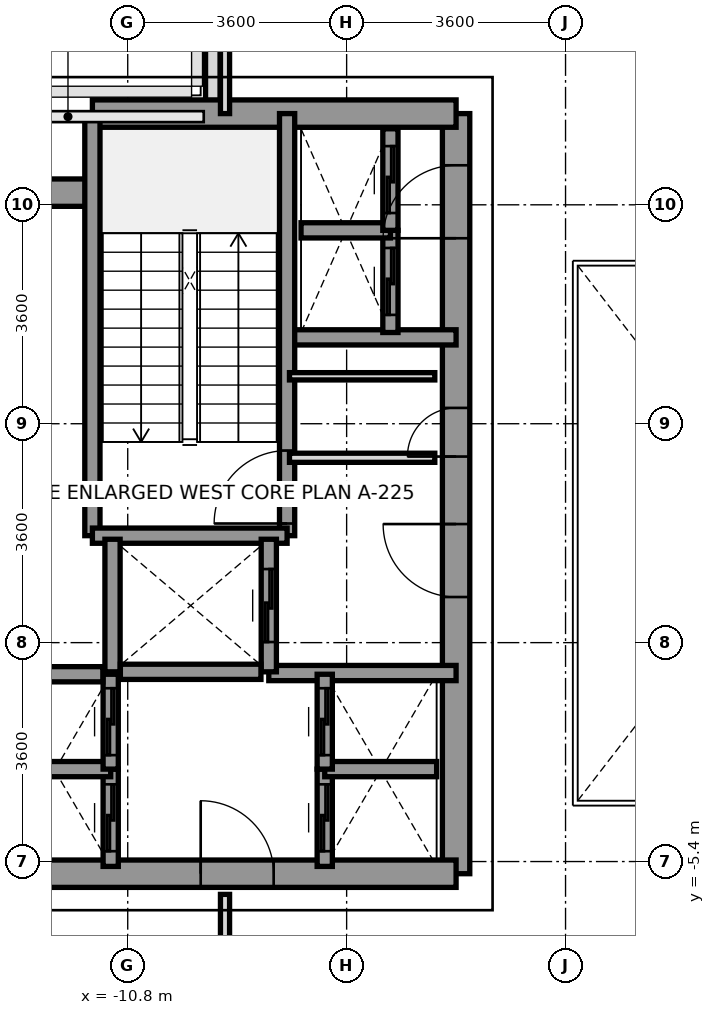
"""IFC4 building model, lengths in metres.
Left out: names, types, materials, properties, quantities, classifications, styles, units other than length and angle.
Written with IfcOpenShell. Run it as: python <this file> out.ifc"""

import sys

from ifc_helpers import new_model, si_unit, direction, frame, frame_2d, origin, place, context, subcontext, project, spatial, rectangle, extrude, source, transform, mapped, element, fill, save


model = new_model("IFC4")
c1 = context("Model", 3, precision=1e-05, world=origin(), true_north=direction((0.0, 1.0)))
c2 = subcontext(c1, "Body", "Model", "MODEL_VIEW")
j1 = project(units=[si_unit("LENGTHUNIT", "METRE"), si_unit("PLANEANGLEUNIT", "RADIAN")], contexts=[c1])
p1 = place(None, origin())
s1 = spatial("IfcSite", under=j1, at=p1, CompositionType="ELEMENT")
p2 = place(p1, origin())
s2 = spatial("IfcBuilding", under=s1, at=p2, CompositionType="ELEMENT")
p3 = place(p2, frame((0.0, 0.0, 93.0)))
s3 = spatial("IfcBuildingStorey", under=s2, at=p3, CompositionType="ELEMENT", Elevation=93.0)
p4 = place(p3, frame((-9.4, 6.953, 0.0), z_axis=(0.0, 0.0, 1.0), x_axis=(0.0, 1.0, 0.0)))
e1 = element("IfcWall", 1, at=p4, inside=s3, PredefinedType="PARAPET", context=c2, shape_type="SweptSolid", body=[
    extrude(rectangle(XDim=1.519, YDim=0.24, at=frame_2d((0.76, 0.0))), origin(), (0.0, 0.0, 1.0), 1.15),
])
p5 = place(p3, frame((-5.4, -5.6, 0.0), z_axis=(0.0, 0.0, 1.0), x_axis=(0.0, 1.0, 0.0)))
e2 = element("IfcWall", 2, at=p5, inside=s3, PredefinedType="SHEAR", context=c2, shape_type="SweptSolid", body=[
    extrude(rectangle(XDim=12.5, YDim=0.45, at=frame_2d((6.25, 0.0))), origin(), (0.0, 0.0, 1.0), 4.0),
])
p6 = place(p5, frame((4.55, 0.0, 0.0)))
e3 = element("IfcOpeningElement", 3, at=p6, cuts=e2, PredefinedType="OPENING", context=c2, shape_type="SweptSolid", body=[
    extrude(rectangle(XDim=1.2, YDim=2.2, at=frame_2d((0.6, 1.1))), frame((0.0, 0.235, 0.0), z_axis=(0.0, -1.0, 0.0), x_axis=(1.0, 0.0, 0.0)), (0.0, 0.0, 1.0), 0.47),
])
p7 = place(p5, frame((10.45, 0.0, 0.0)))
e4 = element("IfcOpeningElement", 4, at=p7, cuts=e2, PredefinedType="OPENING", context=c2, shape_type="SweptSolid", body=[
    extrude(rectangle(XDim=1.2, YDim=2.2, at=frame_2d((0.6, 1.1))), frame((0.0, 0.235, 0.0), z_axis=(0.0, -1.0, 0.0), x_axis=(1.0, 0.0, 0.0)), (0.0, 0.0, 1.0), 0.47),
])
p8 = place(p5, frame((6.86, 0.0, 0.0)))
e5 = element("IfcOpeningElement", 5, at=p8, cuts=e2, PredefinedType="OPENING", context=c2, shape_type="SweptSolid", body=[
    extrude(rectangle(XDim=0.8, YDim=2.1, at=frame_2d((0.4, 1.05))), frame((0.0, 0.235, 0.0), z_axis=(0.0, -1.0, 0.0), x_axis=(1.0, 0.0, 0.0)), (0.0, 0.0, 1.0), 0.47),
])
p9 = place(p3, frame((-11.381, 6.9, 0.0), z_axis=(0.0, 0.0, 1.0), x_axis=(1.0, 0.0, 0.0)))
e6 = element("IfcWall", 6, at=p9, inside=s3, PredefinedType="SHEAR", context=c2, shape_type="SweptSolid", body=[
    extrude(rectangle(XDim=5.981, YDim=0.45, at=frame_2d((2.991, 0.0))), origin(), (0.0, 0.0, 1.0), 4.0),
])
p10 = place(p3, frame((-13.2, 5.6, 0.0), z_axis=(0.0, 0.0, 1.0), x_axis=(1.0, 0.0, 0.0)))
e7 = element("IfcWall", 7, at=p10, inside=s3, PredefinedType="SHEAR", context=c2, shape_type="SweptSolid", body=[
    extrude(rectangle(XDim=1.819, YDim=0.45, at=frame_2d((0.909, 0.0))), origin(), (0.0, 0.0, 1.0), 4.0),
])
p11 = place(p3, frame((-13.2, -5.6, 0.0), z_axis=(0.0, 0.0, 1.0), x_axis=(1.0, 0.0, 0.0)))
e8 = element("IfcWall", 8, at=p11, inside=s3, PredefinedType="SHEAR", context=c2, shape_type="SweptSolid", body=[
    extrude(rectangle(XDim=7.8, YDim=0.45, at=frame_2d((3.9, 0.0))), origin(), (0.0, 0.0, 1.0), 4.0),
])
p12 = place(p11, frame((3.6, 0.0, 0.0)))
e9 = element("IfcOpeningElement", 9, at=p12, cuts=e8, PredefinedType="OPENING", context=c2, shape_type="SweptSolid", body=[
    extrude(rectangle(XDim=1.2, YDim=2.2, at=frame_2d((0.6, 1.1))), frame((0.0, 0.235, 0.0), z_axis=(0.0, -1.0, 0.0), x_axis=(1.0, 0.0, 0.0)), (0.0, 0.0, 1.0), 0.47),
])
p13 = place(p3, frame((-8.18, 3.22, 0.0), z_axis=(0.0, 0.0, 1.0), x_axis=(1.0, 0.0, 0.0)))
e10 = element("IfcWall", 10, at=p13, inside=s3, PredefinedType="SOLIDWALL", context=c2, shape_type="SweptSolid", body=[
    extrude(rectangle(XDim=2.78, YDim=0.25, at=frame_2d((1.39, 0.0))), origin(), (0.0, 0.0, 1.0), 4.0),
])
p14 = place(p3, frame((-8.48, -2.3, 0.0), z_axis=(0.0, 0.0, 1.0), x_axis=(1.0, 0.0, 0.0)))
e11 = element("IfcWall", 11, at=p14, inside=s3, PredefinedType="SOLIDWALL", context=c2, shape_type="SweptSolid", body=[
    extrude(rectangle(XDim=3.08, YDim=0.25, at=frame_2d((1.54, 0.0))), origin(), (0.0, 0.0, 1.0), 4.0),
])
p15 = place(p3, frame((-8.179, -0.041, 0.0), z_axis=(0.0, 0.0, 1.0), x_axis=(0.0, 1.0, 0.0)))
e12 = element("IfcWall", 12, at=p15, inside=s3, PredefinedType="SOLIDWALL", context=c2, shape_type="SweptSolid", body=[
    extrude(rectangle(XDim=6.941, YDim=0.25, at=frame_2d((3.47, 0.0))), origin(), (0.0, 0.0, 1.0), 4.0),
])
p16 = place(p15, frame((0.2, 0.0, 0.0)))
e13 = element("IfcOpeningElement", 13, at=p16, cuts=e12, PredefinedType="OPENING", context=c2, shape_type="SweptSolid", body=[
    extrude(rectangle(XDim=1.2, YDim=2.2, at=frame_2d((0.6, 1.1))), frame((0.0, 0.135, 0.0), z_axis=(0.0, -1.0, 0.0), x_axis=(1.0, 0.0, 0.0)), (0.0, 0.0, 1.0), 0.27),
])
p17 = place(p3, frame((-11.381, -0.041, 0.0), z_axis=(0.0, 0.0, 1.0), x_axis=(0.0, 1.0, 0.0)))
e14 = element("IfcWall", 14, at=p17, inside=s3, PredefinedType="SOLIDWALL", context=c2, shape_type="SweptSolid", body=[
    extrude(rectangle(XDim=6.941, YDim=0.25, at=frame_2d((3.47, 0.0))), origin(), (0.0, 0.0, 1.0), 4.0),
])
p18 = place(p3, frame((-11.381, -0.041, 0.0), z_axis=(0.0, 0.0, 1.0), x_axis=(1.0, 0.0, 0.0)))
e15 = element("IfcWall", 15, at=p18, inside=s3, PredefinedType="SOLIDWALL", context=c2, shape_type="SweptSolid", body=[
    extrude(rectangle(XDim=3.202, YDim=0.25, at=frame_2d((1.601, 0.0))), origin(), (0.0, 0.0, 1.0), 4.0),
])
p19 = place(p3, frame((-11.05, -2.28, 0.0), z_axis=(0.0, 0.0, 1.0), x_axis=(0.0, 1.0, 0.0)))
e16 = element("IfcWall", 16, at=p19, inside=s3, PredefinedType="SOLIDWALL", context=c2, shape_type="SweptSolid", body=[
    extrude(rectangle(XDim=2.18, YDim=0.25, at=frame_2d((1.09, 0.0))), origin(), (0.0, 0.0, 1.0), 4.0),
])
p20 = place(p3, frame((-8.48, -2.28, 0.0), z_axis=(0.0, 0.0, 1.0), x_axis=(0.0, 1.0, 0.0)))
e17 = element("IfcWall", 17, at=p20, inside=s3, PredefinedType="SOLIDWALL", context=c2, shape_type="SweptSolid", body=[
    extrude(rectangle(XDim=2.18, YDim=0.25, at=frame_2d((1.09, 0.0))), origin(), (0.0, 0.0, 1.0), 4.0),
])
p21 = place(p20, frame((0.49, 0.0, 0.0)))
e18 = element("IfcOpeningElement", 18, at=p21, cuts=e17, PredefinedType="OPENING", context=c2, shape_type="SweptSolid", body=[
    extrude(rectangle(XDim=1.2, YDim=2.2, at=frame_2d((0.6, 1.1))), frame((0.0, 0.135, 0.0), z_axis=(0.0, -1.0, 0.0), x_axis=(1.0, 0.0, 0.0)), (0.0, 0.0, 1.0), 0.27),
])
p22 = place(p3, frame((-10.921, -2.28, 0.0), z_axis=(0.0, 0.0, 1.0), x_axis=(1.0, 0.0, 0.0)))
e19 = element("IfcWall", 19, at=p22, inside=s3, PredefinedType="SOLIDWALL", context=c2, shape_type="SweptSolid", body=[
    extrude(rectangle(XDim=2.312, YDim=0.25, at=frame_2d((1.156, 0.0))), origin(), (0.0, 0.0, 1.0), 4.0),
])
p23 = place(p3, frame((-11.08, -5.48, 0.0), z_axis=(0.0, 0.0, 1.0), x_axis=(0.0, 1.0, 0.0)))
e20 = element("IfcWall", 20, at=p23, inside=s3, PredefinedType="SOLIDWALL", context=c2, shape_type="SweptSolid", body=[
    extrude(rectangle(XDim=1.6, YDim=0.25, at=frame_2d((0.8, 0.0))), origin(), (0.0, 0.0, 1.0), 4.0),
])
p24 = place(p23, frame((0.25, 0.0, 0.0)))
e21 = element("IfcOpeningElement", 21, at=p24, cuts=e20, PredefinedType="OPENING", context=c2, shape_type="SweptSolid", body=[
    extrude(rectangle(XDim=1.1, YDim=2.2, at=frame_2d((0.55, 1.1))), frame((0.0, 0.135, 0.0), z_axis=(0.0, -1.0, 0.0), x_axis=(1.0, 0.0, 0.0)), (0.0, 0.0, 1.0), 0.27),
])
p25 = place(p3, frame((-12.92, -3.88, 0.0), z_axis=(0.0, 0.0, 1.0), x_axis=(1.0, 0.0, 0.0)))
e22 = element("IfcWall", 22, at=p25, inside=s3, PredefinedType="SOLIDWALL", context=c2, shape_type="SweptSolid", body=[
    extrude(rectangle(XDim=1.84, YDim=0.25, at=frame_2d((0.92, 0.0))), origin(), (0.0, 0.0, 1.0), 4.0),
])
p26 = place(p3, frame((-11.08, -3.88, 0.0), z_axis=(0.0, 0.0, 1.0), x_axis=(0.0, 1.0, 0.0)))
e23 = element("IfcWall", 23, at=p26, inside=s3, PredefinedType="SOLIDWALL", context=c2, shape_type="SweptSolid", body=[
    extrude(rectangle(XDim=1.56, YDim=0.25, at=frame_2d((0.78, 0.0))), origin(), (0.0, 0.0, 1.0), 4.0),
])
p27 = place(p26, frame((0.23, 0.0, 0.0)))
e24 = element("IfcOpeningElement", 24, at=p27, cuts=e23, PredefinedType="OPENING", context=c2, shape_type="SweptSolid", body=[
    extrude(rectangle(XDim=1.1, YDim=2.2, at=frame_2d((0.55, 1.1))), frame((0.0, 0.135, 0.0), z_axis=(0.0, -1.0, 0.0), x_axis=(1.0, 0.0, 0.0)), (0.0, 0.0, 1.0), 0.27),
])
p28 = place(p3, frame((-12.791, -2.32, 0.0), z_axis=(0.0, 0.0, 1.0), x_axis=(1.0, 0.0, 0.0)))
e25 = element("IfcWall", 25, at=p28, inside=s3, PredefinedType="SOLIDWALL", context=c2, shape_type="SweptSolid", body=[
    extrude(rectangle(XDim=1.582, YDim=0.25, at=frame_2d((0.791, 0.0))), origin(), (0.0, 0.0, 1.0), 4.0),
])
p29 = place(p3, frame((-7.56, -5.48, 0.0), z_axis=(0.0, 0.0, 1.0), x_axis=(0.0, 1.0, 0.0)))
e26 = element("IfcWall", 26, at=p29, inside=s3, PredefinedType="SOLIDWALL", context=c2, shape_type="SweptSolid", body=[
    extrude(rectangle(XDim=1.6, YDim=0.25, at=frame_2d((0.8, 0.0))), origin(), (0.0, 0.0, 1.0), 4.0),
])
p30 = place(p29, frame((0.25, 0.0, 0.0)))
e27 = element("IfcOpeningElement", 27, at=p30, cuts=e26, PredefinedType="OPENING", context=c2, shape_type="SweptSolid", body=[
    extrude(rectangle(XDim=1.1, YDim=2.2, at=frame_2d((0.55, 1.1))), frame((0.0, 0.135, 0.0), z_axis=(0.0, -1.0, 0.0), x_axis=(1.0, 0.0, 0.0)), (0.0, 0.0, 1.0), 0.27),
])
p31 = place(p3, frame((-7.56, -3.88, 0.0), z_axis=(0.0, 0.0, 1.0), x_axis=(1.0, 0.0, 0.0)))
e28 = element("IfcWall", 28, at=p31, inside=s3, PredefinedType="SOLIDWALL", context=c2, shape_type="SweptSolid", body=[
    extrude(rectangle(XDim=1.84, YDim=0.25, at=frame_2d((0.92, 0.0))), origin(), (0.0, 0.0, 1.0), 4.0),
])
p32 = place(p3, frame((-7.56, -3.88, 0.0), z_axis=(0.0, 0.0, 1.0), x_axis=(0.0, 1.0, 0.0)))
e29 = element("IfcWall", 29, at=p32, inside=s3, PredefinedType="SOLIDWALL", context=c2, shape_type="SweptSolid", body=[
    extrude(rectangle(XDim=1.56, YDim=0.25, at=frame_2d((0.78, 0.0))), origin(), (0.0, 0.0, 1.0), 4.0),
])
p33 = place(p32, frame((0.23, 0.0, 0.0)))
e30 = element("IfcOpeningElement", 30, at=p33, cuts=e29, PredefinedType="OPENING", context=c2, shape_type="SweptSolid", body=[
    extrude(rectangle(XDim=1.1, YDim=2.2, at=frame_2d((0.55, 1.1))), frame((0.0, 0.135, 0.0), z_axis=(0.0, -1.0, 0.0), x_axis=(1.0, 0.0, 0.0)), (0.0, 0.0, 1.0), 0.27),
])
p34 = place(p3, frame((-6.48, 3.3, 0.0), z_axis=(0.0, 0.0, 1.0), x_axis=(0.0, 1.0, 0.0)))
e31 = element("IfcWall", 31, at=p34, inside=s3, PredefinedType="SOLIDWALL", context=c2, shape_type="SweptSolid", body=[
    extrude(rectangle(XDim=1.68, YDim=0.25, at=frame_2d((0.84, 0.0))), origin(), (0.0, 0.0, 1.0), 4.0),
])
p35 = place(p34, frame((0.29, 0.0, 0.0)))
e32 = element("IfcOpeningElement", 32, at=p35, cuts=e31, PredefinedType="OPENING", context=c2, shape_type="SweptSolid", body=[
    extrude(rectangle(XDim=1.1, YDim=2.2, at=frame_2d((0.55, 1.1))), frame((0.0, 0.135, 0.0), z_axis=(0.0, -1.0, 0.0), x_axis=(1.0, 0.0, 0.0)), (0.0, 0.0, 1.0), 0.27),
])
p36 = place(p3, frame((-7.95, 4.98, 0.0), z_axis=(0.0, 0.0, 1.0), x_axis=(1.0, 0.0, 0.0)))
e33 = element("IfcWall", 33, at=p36, inside=s3, PredefinedType="SOLIDWALL", context=c2, shape_type="SweptSolid", body=[
    extrude(rectangle(XDim=1.47, YDim=0.25, at=frame_2d((0.735, 0.0))), origin(), (0.0, 0.0, 1.0), 4.0),
])
p37 = place(p3, frame((-6.48, 4.98, 0.0), z_axis=(0.0, 0.0, 1.0), x_axis=(0.0, 1.0, 0.0)))
e34 = element("IfcWall", 34, at=p37, inside=s3, PredefinedType="SOLIDWALL", context=c2, shape_type="SweptSolid", body=[
    extrude(rectangle(XDim=1.67, YDim=0.25, at=frame_2d((0.835, 0.0))), origin(), (0.0, 0.0, 1.0), 4.0),
])
p38 = place(p37, frame((0.285, 0.0, 0.0)))
e35 = element("IfcOpeningElement", 35, at=p38, cuts=e34, PredefinedType="OPENING", context=c2, shape_type="SweptSolid", body=[
    extrude(rectangle(XDim=1.1, YDim=2.2, at=frame_2d((0.55, 1.1))), frame((0.0, 0.135, 0.0), z_axis=(0.0, -1.0, 0.0), x_axis=(1.0, 0.0, 0.0)), (0.0, 0.0, 1.0), 0.27),
])
p39 = place(p3, frame((-8.14, 1.24, 0.0), z_axis=(0.0, 0.0, 1.0), x_axis=(1.0, 0.0, 0.0)))
e36 = element("IfcWall", 36, at=p39, inside=s3, PredefinedType="PARTITIONING", context=c2, shape_type="SweptSolid", body=[
    extrude(rectangle(XDim=2.39, YDim=0.15, at=frame_2d((1.195, 0.0))), origin(), (0.0, 0.0, 1.0), 3.1),
])
p40 = place(p3, frame((-8.14, 2.58, 0.0), z_axis=(0.0, 0.0, 1.0), x_axis=(1.0, 0.0, 0.0)))
e37 = element("IfcWall", 37, at=p40, inside=s3, PredefinedType="PARTITIONING", context=c2, shape_type="SweptSolid", body=[
    extrude(rectangle(XDim=2.39, YDim=0.12, at=frame_2d((1.195, 0.0))), origin(), (0.0, 0.0, 1.0), 3.1),
])
p41 = place(p3, frame((-9.2, 6.9, 0.0), z_axis=(0.0, 0.0, 1.0), x_axis=(0.0, 1.0, 0.0)))
e38 = element("IfcWall", 38, at=p41, inside=s3, PredefinedType="PARTITIONING", context=c2, shape_type="SweptSolid", body=[
    extrude(rectangle(XDim=8.78, YDim=0.15, at=frame_2d((4.39, 0.0))), origin(), (0.0, 0.0, 1.0), 3.5),
])
p42 = place(p3, frame((-9.2, -15.68, 0.0), z_axis=(0.0, 0.0, 1.0), x_axis=(0.0, 1.0, 0.0)))
e39 = element("IfcWall", 39, at=p42, inside=s3, PredefinedType="PARTITIONING", context=c2, shape_type="SweptSolid", body=[
    extrude(rectangle(XDim=9.74, YDim=0.15, at=frame_2d((4.87, 0.0))), origin(), (0.0, 0.0, 1.0), 3.5),
])
m1 = source(origin(), c2, "Body", "SweptSolid", [
    extrude(rectangle(XDim=1.2, YDim=2.2, at=frame_2d((0.6, 1.1))), frame((0.0, 0.025, 0.0), z_axis=(0.0, -1.0, 0.0), x_axis=(1.0, 0.0, 0.0)), (0.0, 0.0, 1.0), 0.05),
])
p43 = place(p16, origin())
e40 = element("IfcDoor", 40, at=p43, inside=s3, OperationType="SINGLE_SWING_LEFT", PredefinedType="DOOR", context=c2, shape_type="MappedRepresentation", body=[
    mapped(m1, transform((0.0, 0.0, 0.0), x_axis=(1.0, 0.0, 0.0), y_axis=(0.0, 1.0, 0.0), z_axis=(0.0, 0.0, 1.0), scale=1.0)),
])
fill(e13, e40)
p44 = place(p6, origin())
e41 = element("IfcDoor", 41, at=p44, inside=s3, OperationType="SINGLE_SWING_RIGHT", PredefinedType="DOOR", context=c2, shape_type="MappedRepresentation", body=[
    mapped(m1, transform((0.0, 0.0, 0.0), x_axis=(1.0, 0.0, 0.0), y_axis=(0.0, 1.0, 0.0), z_axis=(0.0, 0.0, 1.0), scale=1.0)),
])
fill(e3, e41)
p45 = place(p7, origin())
e42 = element("IfcDoor", 42, at=p45, inside=s3, OperationType="SINGLE_SWING_LEFT", PredefinedType="DOOR", context=c2, shape_type="MappedRepresentation", body=[
    mapped(m1, transform((0.0, 0.0, 0.0), x_axis=(1.0, 0.0, 0.0), y_axis=(0.0, 1.0, 0.0), z_axis=(0.0, 0.0, 1.0), scale=1.0)),
])
fill(e4, e42)
p46 = place(p12, origin())
e43 = element("IfcDoor", 43, at=p46, inside=s3, OperationType="SINGLE_SWING_LEFT", PredefinedType="DOOR", context=c2, shape_type="MappedRepresentation", body=[
    mapped(m1, transform((0.0, 0.0, 0.0), x_axis=(1.0, 0.0, 0.0), y_axis=(0.0, 1.0, 0.0), z_axis=(0.0, 0.0, 1.0), scale=1.0)),
])
fill(e9, e43)
m2 = source(origin(), c2, "Body", "SweptSolid", [
    extrude(rectangle(XDim=0.8, YDim=2.1, at=frame_2d((0.4, 1.05))), frame((0.0, 0.025, 0.0), z_axis=(0.0, -1.0, 0.0), x_axis=(1.0, 0.0, 0.0)), (0.0, 0.0, 1.0), 0.05),
])
p47 = place(p8, origin())
e44 = element("IfcDoor", 44, at=p47, inside=s3, OperationType="SINGLE_SWING_LEFT", PredefinedType="DOOR", context=c2, shape_type="MappedRepresentation", body=[
    mapped(m2, transform((0.0, 0.0, 0.0), x_axis=(1.0, 0.0, 0.0), y_axis=(0.0, 1.0, 0.0), z_axis=(0.0, 0.0, 1.0), scale=1.0)),
])
fill(e5, e44)
p48 = place(p21, origin())
e45 = element("IfcDoor", 45, at=p48, inside=s3, OperationType="SLIDING_TO_RIGHT", PredefinedType="DOOR", context=c2, shape_type="MappedRepresentation", body=[
    mapped(m1, transform((0.0, 0.0, 0.0), x_axis=(1.0, 0.0, 0.0), y_axis=(0.0, 1.0, 0.0), z_axis=(0.0, 0.0, 1.0), scale=1.0)),
])
fill(e18, e45)
m3 = source(origin(), c2, "Body", "SweptSolid", [
    extrude(rectangle(XDim=1.1, YDim=2.2, at=frame_2d((0.55, 1.1))), frame((0.0, 0.025, 0.0), z_axis=(0.0, -1.0, 0.0), x_axis=(1.0, 0.0, 0.0)), (0.0, 0.0, 1.0), 0.05),
])
p49 = place(p24, origin())
e46 = element("IfcDoor", 46, at=p49, inside=s3, OperationType="SLIDING_TO_LEFT", PredefinedType="DOOR", context=c2, shape_type="MappedRepresentation", body=[
    mapped(m3, transform((0.0, 0.0, 0.0), x_axis=(1.0, 0.0, 0.0), y_axis=(0.0, 1.0, 0.0), z_axis=(0.0, 0.0, 1.0), scale=1.0)),
])
fill(e21, e46)
p50 = place(p27, origin())
e47 = element("IfcDoor", 47, at=p50, inside=s3, OperationType="SLIDING_TO_LEFT", PredefinedType="DOOR", context=c2, shape_type="MappedRepresentation", body=[
    mapped(m3, transform((0.0, 0.0, 0.0), x_axis=(1.0, 0.0, 0.0), y_axis=(0.0, 1.0, 0.0), z_axis=(0.0, 0.0, 1.0), scale=1.0)),
])
fill(e24, e47)
p51 = place(p30, origin())
e48 = element("IfcDoor", 48, at=p51, inside=s3, OperationType="SLIDING_TO_LEFT", PredefinedType="DOOR", context=c2, shape_type="MappedRepresentation", body=[
    mapped(m3, transform((0.0, 0.0, 0.0), x_axis=(1.0, 0.0, 0.0), y_axis=(0.0, 1.0, 0.0), z_axis=(0.0, 0.0, 1.0), scale=1.0)),
])
fill(e27, e48)
p52 = place(p33, origin())
e49 = element("IfcDoor", 49, at=p52, inside=s3, OperationType="SLIDING_TO_LEFT", PredefinedType="DOOR", context=c2, shape_type="MappedRepresentation", body=[
    mapped(m3, transform((0.0, 0.0, 0.0), x_axis=(1.0, 0.0, 0.0), y_axis=(0.0, 1.0, 0.0), z_axis=(0.0, 0.0, 1.0), scale=1.0)),
])
fill(e30, e49)
p53 = place(p35, origin())
e50 = element("IfcDoor", 50, at=p53, inside=s3, OperationType="SLIDING_TO_LEFT", PredefinedType="DOOR", context=c2, shape_type="MappedRepresentation", body=[
    mapped(m3, transform((0.0, 0.0, 0.0), x_axis=(1.0, 0.0, 0.0), y_axis=(0.0, 1.0, 0.0), z_axis=(0.0, 0.0, 1.0), scale=1.0)),
])
fill(e32, e50)
p54 = place(p38, origin())
e51 = element("IfcDoor", 51, at=p54, inside=s3, OperationType="SLIDING_TO_LEFT", PredefinedType="DOOR", context=c2, shape_type="MappedRepresentation", body=[
    mapped(m3, transform((0.0, 0.0, 0.0), x_axis=(1.0, 0.0, 0.0), y_axis=(0.0, 1.0, 0.0), z_axis=(0.0, 0.0, 1.0), scale=1.0)),
])
fill(e35, e51)
save(model, sys.argv[1])
